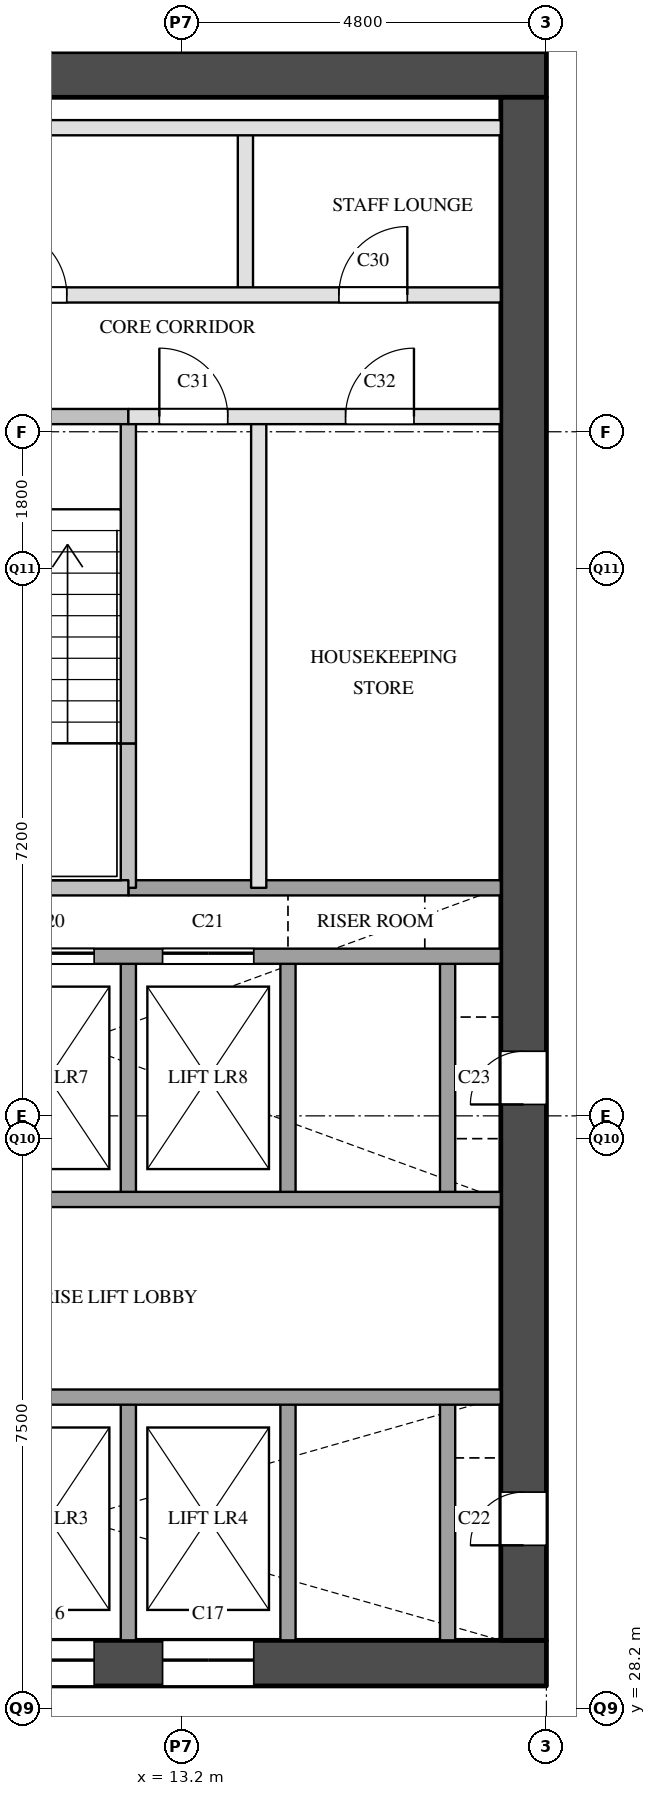
"""IFC4 building model, lengths in metres.
Left out: names, types, materials, properties, quantities, classifications, styles, units other than length and angle.
Written with IfcOpenShell. Run it as: python <this file> out.ifc"""

import sys

from ifc_helpers import new_model, si_unit, direction, frame, frame_2d, origin, place, context, subcontext, project, spatial, rectangle, extrude, element, fill, save


model = new_model("IFC4")
c1 = context("Model", 3, precision=1e-05, world=origin(), true_north=direction((0.0, 1.0)))
c2 = subcontext(c1, "Body", "Model", "MODEL_VIEW")
j1 = project(units=[si_unit("LENGTHUNIT", "METRE"), si_unit("PLANEANGLEUNIT", "RADIAN")], contexts=[c1])
p1 = place(None, origin())
s1 = spatial("IfcSite", under=j1, at=p1, CompositionType="ELEMENT")
p2 = place(p1, origin())
s2 = spatial("IfcBuilding", under=s1, at=p2, CompositionType="ELEMENT")
p3 = place(p2, frame((0.0, 0.0, 50.0)))
s3 = spatial("IfcBuildingStorey", under=s2, at=p3, CompositionType="ELEMENT", Elevation=50.0)
p4 = place(p3, frame((5.6, 28.8, 0.0), z_axis=(0.0, 0.0, 1.0), x_axis=(1.0, 0.0, 0.0)))
e1 = element("IfcWall", 1, at=p4, inside=s3, PredefinedType="SHEAR", context=c2, shape_type="SweptSolid", body=[
    extrude(rectangle(XDim=12.4, YDim=0.6, at=frame_2d((6.2, 0.0))), origin(), (0.0, 0.0, 1.0), 3.5),
])
p5 = place(p4, frame((1.05, 0.0, 0.0)))
e2 = element("IfcOpeningElement", 2, at=p5, cuts=e1, PredefinedType="OPENING", context=c2, shape_type="SweptSolid", body=[
    extrude(rectangle(XDim=1.2, YDim=2.1, at=frame_2d((0.6, 1.05))), frame((0.0, 0.31, 0.0), z_axis=(0.0, -1.0, 0.0), x_axis=(1.0, 0.0, 0.0)), (0.0, 0.0, 1.0), 0.62),
])
p6 = place(p4, frame((5.25, 0.0, 0.0)))
e3 = element("IfcOpeningElement", 3, at=p6, cuts=e1, PredefinedType="OPENING", context=c2, shape_type="SweptSolid", body=[
    extrude(rectangle(XDim=1.2, YDim=2.1, at=frame_2d((0.6, 1.05))), frame((0.0, 0.31, 0.0), z_axis=(0.0, -1.0, 0.0), x_axis=(1.0, 0.0, 0.0)), (0.0, 0.0, 1.0), 0.62),
])
p7 = place(p4, frame((7.35, 0.0, 0.0)))
e4 = element("IfcOpeningElement", 4, at=p7, cuts=e1, PredefinedType="OPENING", context=c2, shape_type="SweptSolid", body=[
    extrude(rectangle(XDim=1.2, YDim=2.1, at=frame_2d((0.6, 1.05))), frame((0.0, 0.31, 0.0), z_axis=(0.0, -1.0, 0.0), x_axis=(1.0, 0.0, 0.0)), (0.0, 0.0, 1.0), 0.62),
])
p8 = place(p3, frame((5.6, 49.7, 0.0), z_axis=(0.0, 0.0, 1.0), x_axis=(1.0, 0.0, 0.0)))
e5 = element("IfcWall", 5, at=p8, inside=s3, PredefinedType="SHEAR", context=c2, shape_type="SweptSolid", body=[
    extrude(rectangle(XDim=12.4, YDim=0.6, at=frame_2d((6.2, 0.0))), origin(), (0.0, 0.0, 1.0), 3.5),
])
p9 = place(p3, frame((17.7, 29.1, 0.0), z_axis=(0.0, 0.0, 1.0), x_axis=(0.0, 1.0, 0.0)))
e6 = element("IfcWall", 6, at=p9, inside=s3, PredefinedType="SHEAR", context=c2, shape_type="SweptSolid", body=[
    extrude(rectangle(XDim=20.3, YDim=0.6, at=frame_2d((10.15, 0.0))), origin(), (0.0, 0.0, 1.0), 3.5),
])
p10 = place(p9, frame((1.25, 0.0, 0.0)))
e7 = element("IfcOpeningElement", 7, at=p10, cuts=e6, PredefinedType="OPENING", context=c2, shape_type="SweptSolid", body=[
    extrude(rectangle(XDim=0.7, YDim=2.1, at=frame_2d((0.35, 1.05))), frame((0.0, 0.31, 0.0), z_axis=(0.0, -1.0, 0.0), x_axis=(1.0, 0.0, 0.0)), (0.0, 0.0, 1.0), 0.62),
])
p11 = place(p9, frame((7.05, 0.0, 0.0)))
e8 = element("IfcOpeningElement", 8, at=p11, cuts=e6, PredefinedType="OPENING", context=c2, shape_type="SweptSolid", body=[
    extrude(rectangle(XDim=0.7, YDim=2.1, at=frame_2d((0.35, 1.05))), frame((0.0, 0.31, 0.0), z_axis=(0.0, -1.0, 0.0), x_axis=(1.0, 0.0, 0.0)), (0.0, 0.0, 1.0), 0.62),
])
p12 = place(p3, frame((12.5, 29.1, 0.0), z_axis=(0.0, 0.0, 1.0), x_axis=(0.0, 1.0, 0.0)))
e9 = element("IfcWall", 9, at=p12, inside=s3, PredefinedType="SOLIDWALL", context=c2, shape_type="SweptSolid", body=[
    extrude(rectangle(XDim=3.2, YDim=0.2, at=frame_2d((1.6, 0.0))), origin(), (0.0, 0.0, 1.0), 3.5),
])
p13 = place(p3, frame((12.5, 34.9, 0.0), z_axis=(0.0, 0.0, 1.0), x_axis=(0.0, 1.0, 0.0)))
e10 = element("IfcWall", 10, at=p13, inside=s3, PredefinedType="SOLIDWALL", context=c2, shape_type="SweptSolid", body=[
    extrude(rectangle(XDim=3.2, YDim=0.2, at=frame_2d((1.6, 0.0))), origin(), (0.0, 0.0, 1.0), 3.5),
])
p14 = place(p3, frame((12.5, 39.0, 0.0), z_axis=(0.0, 0.0, 1.0), x_axis=(0.0, 1.0, 0.0)))
e11 = element("IfcWall", 11, at=p14, inside=s3, PredefinedType="SOLIDWALL", context=c2, shape_type="SweptSolid", body=[
    extrude(rectangle(XDim=1.9, YDim=0.2, at=frame_2d((0.95, 0.0))), origin(), (0.0, 0.0, 1.0), 3.5),
])
p15 = place(p3, frame((12.5, 40.9, 0.0), z_axis=(0.0, 0.0, 1.0), x_axis=(0.0, 1.0, 0.0)))
e12 = element("IfcWall", 12, at=p15, inside=s3, PredefinedType="SOLIDWALL", context=c2, shape_type="SweptSolid", body=[
    extrude(rectangle(XDim=4.3, YDim=0.2, at=frame_2d((2.15, 0.0))), origin(), (0.0, 0.0, 1.0), 3.5),
])
p16 = place(p3, frame((14.04, 46.8, 0.0), z_axis=(0.0, 0.0, 1.0), x_axis=(0.0, 1.0, 0.0)))
e13 = element("IfcWall", 13, at=p16, inside=s3, PredefinedType="PARTITIONING", context=c2, shape_type="SweptSolid", body=[
    extrude(rectangle(XDim=2.2, YDim=0.2, at=frame_2d((1.1, 0.0))), origin(), (0.0, 0.0, 1.0), 3.5),
])
p17 = place(p3, frame((14.215, 39.0, 0.0), z_axis=(0.0, 0.0, 1.0), x_axis=(0.0, 1.0, 0.0)))
e14 = element("IfcWall", 14, at=p17, inside=s3, PredefinedType="PARTITIONING", context=c2, shape_type="SweptSolid", body=[
    extrude(rectangle(XDim=6.2, YDim=0.2, at=frame_2d((3.1, 0.0))), origin(), (0.0, 0.0, 1.0), 3.5),
])
p18 = place(p3, frame((14.6, 29.1, 0.0), z_axis=(0.0, 0.0, 1.0), x_axis=(0.0, 1.0, 0.0)))
e15 = element("IfcWall", 15, at=p18, inside=s3, PredefinedType="SOLIDWALL", context=c2, shape_type="SweptSolid", body=[
    extrude(rectangle(XDim=3.2, YDim=0.2, at=frame_2d((1.6, 0.0))), origin(), (0.0, 0.0, 1.0), 3.5),
])
p19 = place(p3, frame((14.6, 34.9, 0.0), z_axis=(0.0, 0.0, 1.0), x_axis=(0.0, 1.0, 0.0)))
e16 = element("IfcWall", 16, at=p19, inside=s3, PredefinedType="SOLIDWALL", context=c2, shape_type="SweptSolid", body=[
    extrude(rectangle(XDim=3.2, YDim=0.2, at=frame_2d((1.6, 0.0))), origin(), (0.0, 0.0, 1.0), 3.5),
])
p20 = place(p3, frame((16.7, 29.1, 0.0), z_axis=(0.0, 0.0, 1.0), x_axis=(0.0, 1.0, 0.0)))
e17 = element("IfcWall", 17, at=p20, inside=s3, PredefinedType="SOLIDWALL", context=c2, shape_type="SweptSolid", body=[
    extrude(rectangle(XDim=3.2, YDim=0.2, at=frame_2d((1.6, 0.0))), origin(), (0.0, 0.0, 1.0), 3.5),
])
p21 = place(p3, frame((16.7, 34.9, 0.0), z_axis=(0.0, 0.0, 1.0), x_axis=(0.0, 1.0, 0.0)))
e18 = element("IfcWall", 18, at=p21, inside=s3, PredefinedType="SOLIDWALL", context=c2, shape_type="SweptSolid", body=[
    extrude(rectangle(XDim=3.2, YDim=0.2, at=frame_2d((1.6, 0.0))), origin(), (0.0, 0.0, 1.0), 3.5),
])
p22 = place(p3, frame((6.2, 32.3, 0.0), z_axis=(0.0, 0.0, 1.0), x_axis=(1.0, 0.0, 0.0)))
e19 = element("IfcWall", 19, at=p22, inside=s3, PredefinedType="SOLIDWALL", context=c2, shape_type="SweptSolid", body=[
    extrude(rectangle(XDim=11.2, YDim=0.2, at=frame_2d((5.6, 0.0))), origin(), (0.0, 0.0, 1.0), 3.5),
])
p23 = place(p22, frame((2.55, 0.0, 0.0)))
e20 = element("IfcOpeningElement", 20, at=p23, cuts=e19, PredefinedType="OPENING", context=c2, shape_type="SweptSolid", body=[
    extrude(rectangle(XDim=1.2, YDim=2.1, at=frame_2d((0.6, 1.05))), frame((0.0, 0.11, 0.0), z_axis=(0.0, -1.0, 0.0), x_axis=(1.0, 0.0, 0.0)), (0.0, 0.0, 1.0), 0.22),
])
p24 = place(p3, frame((6.2, 34.9, 0.0), z_axis=(0.0, 0.0, 1.0), x_axis=(1.0, 0.0, 0.0)))
e21 = element("IfcWall", 21, at=p24, inside=s3, PredefinedType="SOLIDWALL", context=c2, shape_type="SweptSolid", body=[
    extrude(rectangle(XDim=11.2, YDim=0.2, at=frame_2d((5.6, 0.0))), origin(), (0.0, 0.0, 1.0), 3.5),
])
p25 = place(p3, frame((6.2, 38.1, 0.0), z_axis=(0.0, 0.0, 1.0), x_axis=(1.0, 0.0, 0.0)))
e22 = element("IfcWall", 22, at=p25, inside=s3, PredefinedType="SOLIDWALL", context=c2, shape_type="SweptSolid", body=[
    extrude(rectangle(XDim=11.2, YDim=0.2, at=frame_2d((5.6, 0.0))), origin(), (0.0, 0.0, 1.0), 3.5),
])
p26 = place(p25, frame((0.45, 0.0, 0.0)))
e23 = element("IfcOpeningElement", 23, at=p26, cuts=e22, PredefinedType="OPENING", context=c2, shape_type="SweptSolid", body=[
    extrude(rectangle(XDim=1.2, YDim=2.1, at=frame_2d((0.6, 1.05))), frame((0.0, 0.11, 0.0), z_axis=(0.0, -1.0, 0.0), x_axis=(1.0, 0.0, 0.0)), (0.0, 0.0, 1.0), 0.22),
])
p27 = place(p25, frame((2.55, 0.0, 0.0)))
e24 = element("IfcOpeningElement", 24, at=p27, cuts=e22, PredefinedType="OPENING", context=c2, shape_type="SweptSolid", body=[
    extrude(rectangle(XDim=1.2, YDim=2.1, at=frame_2d((0.6, 1.05))), frame((0.0, 0.11, 0.0), z_axis=(0.0, -1.0, 0.0), x_axis=(1.0, 0.0, 0.0)), (0.0, 0.0, 1.0), 0.22),
])
p28 = place(p25, frame((4.65, 0.0, 0.0)))
e25 = element("IfcOpeningElement", 25, at=p28, cuts=e22, PredefinedType="OPENING", context=c2, shape_type="SweptSolid", body=[
    extrude(rectangle(XDim=1.2, YDim=2.1, at=frame_2d((0.6, 1.05))), frame((0.0, 0.11, 0.0), z_axis=(0.0, -1.0, 0.0), x_axis=(1.0, 0.0, 0.0)), (0.0, 0.0, 1.0), 0.22),
])
p29 = place(p25, frame((6.75, 0.0, 0.0)))
e26 = element("IfcOpeningElement", 26, at=p29, cuts=e22, PredefinedType="OPENING", context=c2, shape_type="SweptSolid", body=[
    extrude(rectangle(XDim=1.2, YDim=2.1, at=frame_2d((0.6, 1.05))), frame((0.0, 0.11, 0.0), z_axis=(0.0, -1.0, 0.0), x_axis=(1.0, 0.0, 0.0)), (0.0, 0.0, 1.0), 0.22),
])
p30 = place(p3, frame((12.5, 39.0, 0.0), z_axis=(0.0, 0.0, 1.0), x_axis=(1.0, 0.0, 0.0)))
e27 = element("IfcWall", 27, at=p30, inside=s3, PredefinedType="SOLIDWALL", context=c2, shape_type="SweptSolid", body=[
    extrude(rectangle(XDim=4.9, YDim=0.2, at=frame_2d((2.45, 0.0))), origin(), (0.0, 0.0, 1.0), 3.5),
])
p31 = place(p3, frame((9.45, 39.0, 0.0), z_axis=(0.0, 0.0, 1.0), x_axis=(1.0, 0.0, 0.0)))
e28 = element("IfcWall", 28, at=p31, inside=s3, PredefinedType="SOLIDWALL", context=c2, shape_type="SweptSolid", body=[
    extrude(rectangle(XDim=3.05, YDim=0.2, at=frame_2d((1.525, 0.0))), origin(), (0.0, 0.0, 1.0), 3.5),
])
p32 = place(p3, frame((12.5, 45.2, 0.0), z_axis=(0.0, 0.0, 1.0), x_axis=(1.0, 0.0, 0.0)))
e29 = element("IfcWall", 29, at=p32, inside=s3, PredefinedType="PARTITIONING", context=c2, shape_type="SweptSolid", body=[
    extrude(rectangle(XDim=4.9, YDim=0.2, at=frame_2d((2.45, 0.0))), origin(), (0.0, 0.0, 1.0), 3.5),
])
p33 = place(p32, frame((0.407, 0.0, 0.0)))
e30 = element("IfcOpeningElement", 30, at=p33, cuts=e29, PredefinedType="OPENING", context=c2, shape_type="SweptSolid", body=[
    extrude(rectangle(XDim=0.9, YDim=2.1, at=frame_2d((0.45, 1.05))), frame((0.0, 0.11, 0.0), z_axis=(0.0, -1.0, 0.0), x_axis=(1.0, 0.0, 0.0)), (0.0, 0.0, 1.0), 0.22),
])
p34 = place(p32, frame((2.857, 0.0, 0.0)))
e31 = element("IfcOpeningElement", 31, at=p34, cuts=e29, PredefinedType="OPENING", context=c2, shape_type="SweptSolid", body=[
    extrude(rectangle(XDim=0.9, YDim=2.1, at=frame_2d((0.45, 1.05))), frame((0.0, 0.11, 0.0), z_axis=(0.0, -1.0, 0.0), x_axis=(1.0, 0.0, 0.0)), (0.0, 0.0, 1.0), 0.22),
])
p35 = place(p3, frame((6.2, 45.2, 0.0), z_axis=(0.0, 0.0, 1.0), x_axis=(1.0, 0.0, 0.0)))
e32 = element("IfcWall", 32, at=p35, inside=s3, PredefinedType="SOLIDWALL", context=c2, shape_type="SweptSolid", body=[
    extrude(rectangle(XDim=6.3, YDim=0.2, at=frame_2d((3.15, 0.0))), origin(), (0.0, 0.0, 1.0), 3.5),
])
p36 = place(p35, frame((1.025, 0.0, 0.0)))
e33 = element("IfcOpeningElement", 33, at=p36, cuts=e32, PredefinedType="OPENING", context=c2, shape_type="SweptSolid", body=[
    extrude(rectangle(XDim=1.1, YDim=2.1, at=frame_2d((0.55, 1.05))), frame((0.0, 0.11, 0.0), z_axis=(0.0, -1.0, 0.0), x_axis=(1.0, 0.0, 0.0)), (0.0, 0.0, 1.0), 0.22),
])
p37 = place(p35, frame((4.175, 0.0, 0.0)))
e34 = element("IfcOpeningElement", 34, at=p37, cuts=e32, PredefinedType="OPENING", context=c2, shape_type="SweptSolid", body=[
    extrude(rectangle(XDim=1.1, YDim=2.1, at=frame_2d((0.55, 1.05))), frame((0.0, 0.11, 0.0), z_axis=(0.0, -1.0, 0.0), x_axis=(1.0, 0.0, 0.0)), (0.0, 0.0, 1.0), 0.22),
])
p38 = place(p3, frame((6.2, 46.8, 0.0), z_axis=(0.0, 0.0, 1.0), x_axis=(1.0, 0.0, 0.0)))
e35 = element("IfcWall", 35, at=p38, inside=s3, PredefinedType="PARTITIONING", context=c2, shape_type="SweptSolid", body=[
    extrude(rectangle(XDim=11.2, YDim=0.2, at=frame_2d((5.6, 0.0))), origin(), (0.0, 0.0, 1.0), 3.5),
])
p39 = place(p38, frame((0.67, 0.0, 0.0)))
e36 = element("IfcOpeningElement", 36, at=p39, cuts=e35, PredefinedType="OPENING", context=c2, shape_type="SweptSolid", body=[
    extrude(rectangle(XDim=0.9, YDim=2.1, at=frame_2d((0.45, 1.05))), frame((0.0, 0.11, 0.0), z_axis=(0.0, -1.0, 0.0), x_axis=(1.0, 0.0, 0.0)), (0.0, 0.0, 1.0), 0.22),
])
p40 = place(p38, frame((4.59, 0.0, 0.0)))
e37 = element("IfcOpeningElement", 37, at=p40, cuts=e35, PredefinedType="OPENING", context=c2, shape_type="SweptSolid", body=[
    extrude(rectangle(XDim=0.9, YDim=2.1, at=frame_2d((0.45, 1.05))), frame((0.0, 0.11, 0.0), z_axis=(0.0, -1.0, 0.0), x_axis=(1.0, 0.0, 0.0)), (0.0, 0.0, 1.0), 0.22),
])
p41 = place(p38, frame((9.07, 0.0, 0.0)))
e38 = element("IfcOpeningElement", 38, at=p41, cuts=e35, PredefinedType="OPENING", context=c2, shape_type="SweptSolid", body=[
    extrude(rectangle(XDim=0.9, YDim=2.1, at=frame_2d((0.45, 1.05))), frame((0.0, 0.11, 0.0), z_axis=(0.0, -1.0, 0.0), x_axis=(1.0, 0.0, 0.0)), (0.0, 0.0, 1.0), 0.22),
])
p42 = place(p3, frame((6.2, 49.0, 0.0), z_axis=(0.0, 0.0, 1.0), x_axis=(1.0, 0.0, 0.0)))
e39 = element("IfcWall", 39, at=p42, inside=s3, PredefinedType="PARTITIONING", context=c2, shape_type="SweptSolid", body=[
    extrude(rectangle(XDim=11.2, YDim=0.2, at=frame_2d((5.6, 0.0))), origin(), (0.0, 0.0, 1.0), 3.5),
])
p43 = place(p6, origin())
e40 = element("IfcDoor", 40, at=p43, inside=s3, OperationType="SLIDING_TO_LEFT", PredefinedType="DOOR", context=c2, shape_type="SweptSolid", body=[
    extrude(rectangle(XDim=1.2, YDim=2.1, at=frame_2d((0.6, 1.05))), frame((0.0, 0.025, 0.0), z_axis=(0.0, -1.0, 0.0), x_axis=(1.0, 0.0, 0.0)), (0.0, 0.0, 1.0), 0.05),
])
fill(e3, e40)
p44 = place(p7, origin())
e41 = element("IfcDoor", 41, at=p44, inside=s3, OperationType="SLIDING_TO_LEFT", PredefinedType="DOOR", context=c2, shape_type="SweptSolid", body=[
    extrude(rectangle(XDim=1.2, YDim=2.1, at=frame_2d((0.6, 1.05))), frame((0.0, 0.025, 0.0), z_axis=(0.0, -1.0, 0.0), x_axis=(1.0, 0.0, 0.0)), (0.0, 0.0, 1.0), 0.05),
])
fill(e4, e41)
p45 = place(p28, origin())
e42 = element("IfcDoor", 42, at=p45, inside=s3, OperationType="SLIDING_TO_LEFT", PredefinedType="DOOR", context=c2, shape_type="SweptSolid", body=[
    extrude(rectangle(XDim=1.2, YDim=2.1, at=frame_2d((0.6, 1.05))), frame((0.0, 0.025, 0.0), z_axis=(0.0, -1.0, 0.0), x_axis=(1.0, 0.0, 0.0)), (0.0, 0.0, 1.0), 0.05),
])
fill(e25, e42)
p46 = place(p29, origin())
e43 = element("IfcDoor", 43, at=p46, inside=s3, OperationType="SLIDING_TO_LEFT", PredefinedType="DOOR", context=c2, shape_type="SweptSolid", body=[
    extrude(rectangle(XDim=1.2, YDim=2.1, at=frame_2d((0.6, 1.05))), frame((0.0, 0.025, 0.0), z_axis=(0.0, -1.0, 0.0), x_axis=(1.0, 0.0, 0.0)), (0.0, 0.0, 1.0), 0.05),
])
fill(e26, e43)
p47 = place(p10, origin())
e44 = element("IfcDoor", 44, at=p47, inside=s3, OperationType="SINGLE_SWING_LEFT", PredefinedType="DOOR", context=c2, shape_type="SweptSolid", body=[
    extrude(rectangle(XDim=0.7, YDim=2.1, at=frame_2d((0.35, 1.05))), frame((0.0, 0.025, 0.0), z_axis=(0.0, -1.0, 0.0), x_axis=(1.0, 0.0, 0.0)), (0.0, 0.0, 1.0), 0.05),
])
fill(e7, e44)
p48 = place(p11, origin())
e45 = element("IfcDoor", 45, at=p48, inside=s3, OperationType="SINGLE_SWING_LEFT", PredefinedType="DOOR", context=c2, shape_type="SweptSolid", body=[
    extrude(rectangle(XDim=0.7, YDim=2.1, at=frame_2d((0.35, 1.05))), frame((0.0, 0.025, 0.0), z_axis=(0.0, -1.0, 0.0), x_axis=(1.0, 0.0, 0.0)), (0.0, 0.0, 1.0), 0.05),
])
fill(e8, e45)
p49 = place(p40, origin())
e46 = element("IfcDoor", 46, at=p49, inside=s3, OperationType="SINGLE_SWING_LEFT", PredefinedType="DOOR", context=c2, shape_type="SweptSolid", body=[
    extrude(rectangle(XDim=0.9, YDim=2.1, at=frame_2d((0.45, 1.05))), frame((0.0, 0.025, 0.0), z_axis=(0.0, -1.0, 0.0), x_axis=(1.0, 0.0, 0.0)), (0.0, 0.0, 1.0), 0.05),
])
fill(e37, e46)
p50 = place(p41, origin())
e47 = element("IfcDoor", 47, at=p50, inside=s3, OperationType="SINGLE_SWING_RIGHT", PredefinedType="DOOR", context=c2, shape_type="SweptSolid", body=[
    extrude(rectangle(XDim=0.9, YDim=2.1, at=frame_2d((0.45, 1.05))), frame((0.0, 0.025, 0.0), z_axis=(0.0, -1.0, 0.0), x_axis=(1.0, 0.0, 0.0)), (0.0, 0.0, 1.0), 0.05),
])
fill(e38, e47)
p51 = place(p33, origin())
e48 = element("IfcDoor", 48, at=p51, inside=s3, OperationType="SINGLE_SWING_LEFT", PredefinedType="DOOR", context=c2, shape_type="SweptSolid", body=[
    extrude(rectangle(XDim=0.9, YDim=2.1, at=frame_2d((0.45, 1.05))), frame((0.0, 0.025, 0.0), z_axis=(0.0, -1.0, 0.0), x_axis=(1.0, 0.0, 0.0)), (0.0, 0.0, 1.0), 0.05),
])
fill(e30, e48)
p52 = place(p34, origin())
e49 = element("IfcDoor", 49, at=p52, inside=s3, OperationType="SINGLE_SWING_RIGHT", PredefinedType="DOOR", context=c2, shape_type="SweptSolid", body=[
    extrude(rectangle(XDim=0.9, YDim=2.1, at=frame_2d((0.45, 1.05))), frame((0.0, 0.025, 0.0), z_axis=(0.0, -1.0, 0.0), x_axis=(1.0, 0.0, 0.0)), (0.0, 0.0, 1.0), 0.05),
])
fill(e31, e49)
save(model, sys.argv[1])
